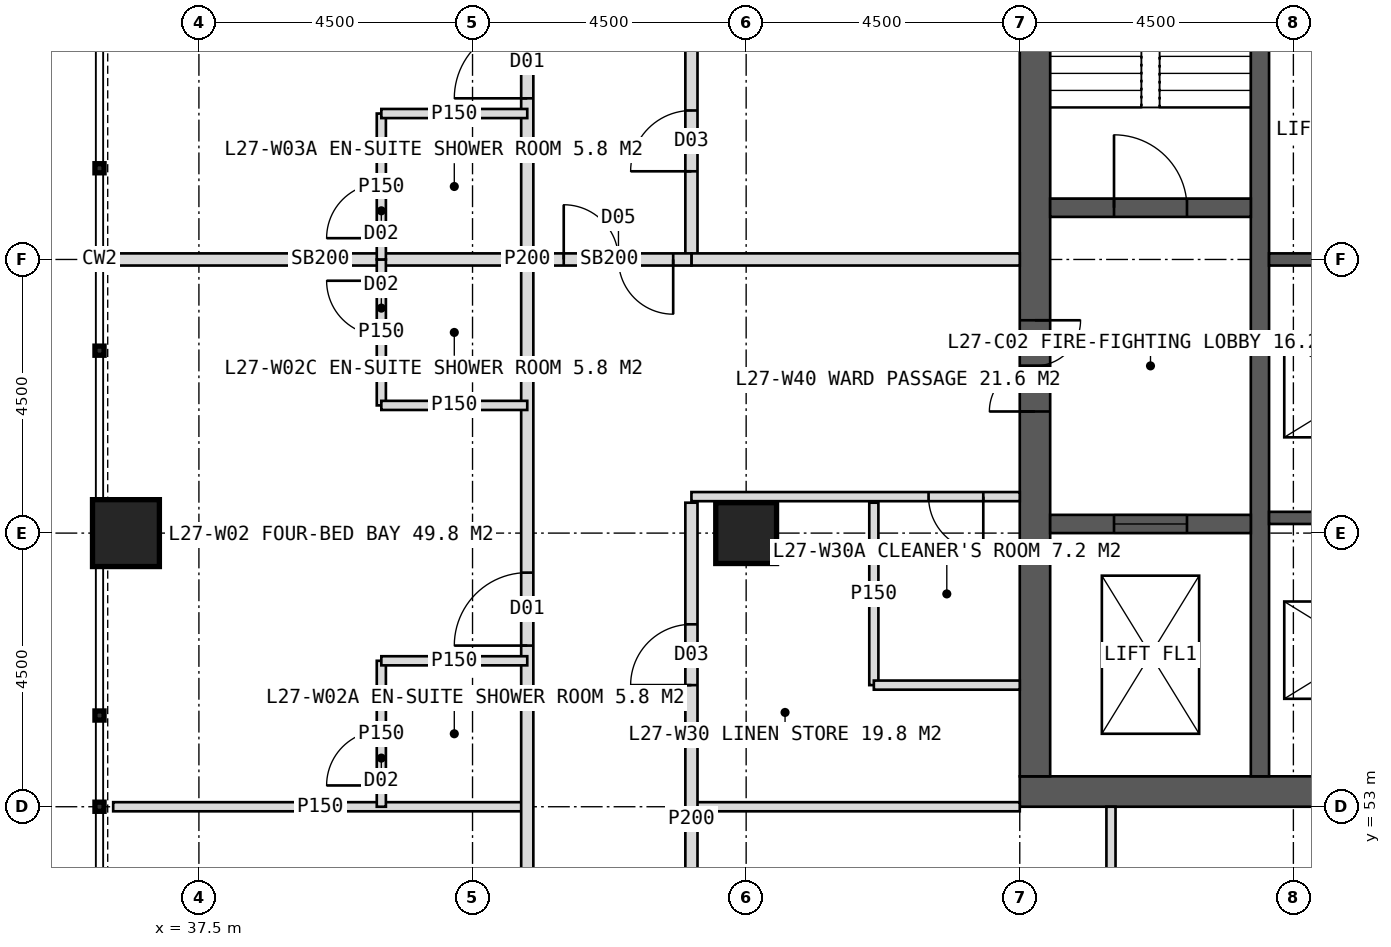
"""IFC4 building model, lengths in metres.
Left out: names, types, materials, properties, quantities, classifications, styles, units other than length and angle.
Written with IfcOpenShell. Run it as: python <this file> out.ifc"""

import sys

from ifc_helpers import new_model, si_unit, direction, frame, frame_2d, origin, origin_2d, place, context, subcontext, project, spatial, rectangle, hollow_rectangle, extrude, element, fill, save


model = new_model("IFC4")
c1 = context("Model", 3, precision=1e-05, world=origin(), true_north=direction((0.0, 1.0)))
c2 = subcontext(c1, "Body", "Model", "MODEL_VIEW")
j1 = project(units=[si_unit("LENGTHUNIT", "METRE"), si_unit("PLANEANGLEUNIT", "RADIAN")], contexts=[c1])
p1 = place(None, origin())
s1 = spatial("IfcSite", under=j1, at=p1, CompositionType="ELEMENT")
p2 = place(p1, origin())
s2 = spatial("IfcBuilding", under=s1, at=p2, CompositionType="ELEMENT")
p3 = place(p2, frame((0.0, 0.0, 116.0)))
s3 = spatial("IfcBuildingStorey", under=s2, at=p3, CompositionType="ELEMENT", Elevation=116.0)
p4 = place(p3, frame((51.0, 53.25, 0.0), z_axis=(0.0, 0.0, 1.0), x_axis=(1.0, 0.0, 0.0)))
e1 = element("IfcWall", 1, at=p4, inside=s3, PredefinedType="SHEAR", context=c2, shape_type="SweptSolid", body=[
    extrude(rectangle(XDim=18.0, YDim=0.5, at=frame_2d((9.0, 0.0))), origin(), (0.0, 0.0, 1.0), 4.0),
])
p5 = place(p4, frame((8.1, 0.0, 0.0)))
e2 = element("IfcOpeningElement", 2, at=p5, cuts=e1, PredefinedType="OPENING", context=c2, shape_type="SweptSolid", body=[
    extrude(rectangle(XDim=1.8, YDim=2.2, at=frame_2d((0.9, 1.1))), frame((0.0, 0.26, 0.0), z_axis=(0.0, -1.0, 0.0), x_axis=(1.0, 0.0, 0.0)), (0.0, 0.0, 1.0), 0.52),
])
p6 = place(p3, frame((51.25, 53.5, 0.0), z_axis=(0.0, 0.0, 1.0), x_axis=(0.0, 1.0, 0.0)))
e3 = element("IfcWall", 3, at=p6, inside=s3, PredefinedType="SHEAR", context=c2, shape_type="SweptSolid", body=[
    extrude(rectangle(XDim=17.0, YDim=0.5, at=frame_2d((8.5, 0.0))), origin(), (0.0, 0.0, 1.0), 4.0),
])
p7 = place(p6, frame((6.0, 0.0, 0.0)))
e4 = element("IfcOpeningElement", 4, at=p7, cuts=e3, PredefinedType="OPENING", context=c2, shape_type="SweptSolid", body=[
    extrude(rectangle(XDim=1.5, YDim=2.2, at=frame_2d((0.75, 1.1))), frame((0.0, 0.26, 0.0), z_axis=(0.0, -1.0, 0.0), x_axis=(1.0, 0.0, 0.0)), (0.0, 0.0, 1.0), 0.52),
])
p8 = place(p3, frame((54.95, 53.5, 0.0), z_axis=(0.0, 0.0, 1.0), x_axis=(0.0, 1.0, 0.0)))
e5 = element("IfcWall", 5, at=p8, inside=s3, PredefinedType="SHEAR", context=c2, shape_type="SweptSolid", body=[
    extrude(rectangle(XDim=17.0, YDim=0.3, at=frame_2d((8.5, 0.0))), origin(), (0.0, 0.0, 1.0), 4.0),
])
for number, where, z_axis, x_axis in (
    (6, (55.1, 57.75, 0.0), (0.0, 0.0, 1.0), (1.0, 0.0, 0.0)),
    (7, (55.1, 62.0, 0.0), (0.0, 0.0, 1.0), (1.0, 0.0, 0.0)),
):
    element("IfcWall", number, at=place(p3, frame(where, z_axis=z_axis, x_axis=x_axis)), inside=s3, PredefinedType="SHEAR", context=c2, shape_type="SweptSolid", body=[
        extrude(rectangle(XDim=3.05, YDim=0.2, at=frame_2d((1.525, 0.0))), origin(), (0.0, 0.0, 1.0), 4.0),
    ])
p9 = place(p3, frame((51.5, 62.85, 0.0), z_axis=(0.0, 0.0, 1.0), x_axis=(1.0, 0.0, 0.0)))
e8 = element("IfcWall", 8, at=p9, inside=s3, PredefinedType="SHEAR", context=c2, shape_type="SweptSolid", body=[
    extrude(rectangle(XDim=3.3, YDim=0.3, at=frame_2d((1.65, 0.0))), origin(), (0.0, 0.0, 1.0), 4.0),
])
p10 = place(p9, frame((1.05, 0.0, 0.0)))
e9 = element("IfcOpeningElement", 9, at=p10, cuts=e8, PredefinedType="OPENING", context=c2, shape_type="SweptSolid", body=[
    extrude(rectangle(XDim=1.2, YDim=2.1, at=frame_2d((0.6, 1.05))), frame((0.0, 0.16, 0.0), z_axis=(0.0, -1.0, 0.0), x_axis=(1.0, 0.0, 0.0)), (0.0, 0.0, 1.0), 0.32),
])
p11 = place(p3, frame((51.5, 57.65, 0.0), z_axis=(0.0, 0.0, 1.0), x_axis=(1.0, 0.0, 0.0)))
e10 = element("IfcWall", 10, at=p11, inside=s3, PredefinedType="SHEAR", context=c2, shape_type="SweptSolid", body=[
    extrude(rectangle(XDim=3.3, YDim=0.3, at=frame_2d((1.65, 0.0))), origin(), (0.0, 0.0, 1.0), 4.0),
])
p12 = place(p11, frame((1.05, 0.0, 0.0)))
e11 = element("IfcOpeningElement", 11, at=p12, cuts=e10, PredefinedType="OPENING", context=c2, shape_type="SweptSolid", body=[
    extrude(rectangle(XDim=1.2, YDim=2.2, at=frame_2d((0.6, 1.1))), frame((0.0, 0.16, 0.0), z_axis=(0.0, -1.0, 0.0), x_axis=(1.0, 0.0, 0.0)), (0.0, 0.0, 1.0), 0.32),
])
p13 = place(p3, frame((46.5, 57.5, 0.0), z_axis=(0.0, 0.0, 1.0), x_axis=(1.0, 0.0, 0.0)))
e12 = element("IfcColumn", 12, at=p13, inside=s3, PredefinedType="COLUMN", context=c2, shape_type="SweptSolid", body=[
    extrude(hollow_rectangle(XDim=1.0, YDim=1.0, WallThickness=0.1, at=origin_2d()), origin(), (0.0, 0.0, 1.0), 4.0),
])
p14 = place(p3, frame((36.3, 57.5, 0.0), z_axis=(0.0, 0.0, 1.0), x_axis=(1.0, 0.0, 0.0)))
e13 = element("IfcColumn", 13, at=p14, inside=s3, PredefinedType="COLUMN", context=c2, shape_type="SweptSolid", body=[
    extrude(hollow_rectangle(XDim=1.1, YDim=1.1, WallThickness=0.1, at=origin_2d()), origin(), (0.0, 0.0, 1.0), 4.0),
])
p15 = place(p3, frame((42.9, 53.0, 0.0), z_axis=(0.0, 0.0, 1.0), x_axis=(-1.0, 0.0, 0.0)))
e14 = element("IfcWall", 14, at=p15, inside=s3, PredefinedType="PARTITIONING", context=c2, shape_type="SweptSolid", body=[
    extrude(rectangle(XDim=6.81, YDim=0.15, at=frame_2d((3.405, 0.0))), origin(), (0.0, 0.0, 1.0), 3.75),
])
p16 = place(p3, frame((42.9, 62.0, 0.0), z_axis=(0.0, 0.0, 1.0), x_axis=(-1.0, 0.0, 0.0)))
e15 = element("IfcWall", 15, at=p16, inside=s3, PredefinedType="SOLIDWALL", context=c2, shape_type="SweptSolid", body=[
    extrude(rectangle(XDim=6.81, YDim=0.2, at=frame_2d((3.405, 0.0))), origin(), (0.0, 0.0, 1.0), 2.95),
])
p17 = place(p3, frame((42.9, 44.9, 0.0), z_axis=(0.0, 0.0, 1.0), x_axis=(0.0, 1.0, 0.0)))
e16 = element("IfcWall", 16, at=p17, inside=s3, PredefinedType="PARTITIONING", context=c2, shape_type="SweptSolid", body=[
    extrude(rectangle(XDim=34.2, YDim=0.2, at=frame_2d((17.1, 0.0))), origin(), (0.0, 0.0, 1.0), 3.75),
])
p18 = place(p17, frame((3.25, 0.0, 0.0)))
e17 = element("IfcOpeningElement", 17, at=p18, cuts=e16, PredefinedType="OPENING", context=c2, shape_type="SweptSolid", body=[
    extrude(rectangle(XDim=1.2, YDim=2.2, at=frame_2d((0.6, 1.1))), frame((0.0, 0.11, 0.0), z_axis=(0.0, -1.0, 0.0), x_axis=(1.0, 0.0, 0.0)), (0.0, 0.0, 1.0), 0.22),
])
p19 = place(p17, frame((10.75, 0.0, 0.0)))
e18 = element("IfcOpeningElement", 18, at=p19, cuts=e16, PredefinedType="OPENING", context=c2, shape_type="SweptSolid", body=[
    extrude(rectangle(XDim=1.2, YDim=2.2, at=frame_2d((0.6, 1.1))), frame((0.0, 0.11, 0.0), z_axis=(0.0, -1.0, 0.0), x_axis=(1.0, 0.0, 0.0)), (0.0, 0.0, 1.0), 0.22),
])
p20 = place(p17, frame((19.75, 0.0, 0.0)))
e19 = element("IfcOpeningElement", 19, at=p20, cuts=e16, PredefinedType="OPENING", context=c2, shape_type="SweptSolid", body=[
    extrude(rectangle(XDim=1.2, YDim=2.2, at=frame_2d((0.6, 1.1))), frame((0.0, 0.11, 0.0), z_axis=(0.0, -1.0, 0.0), x_axis=(1.0, 0.0, 0.0)), (0.0, 0.0, 1.0), 0.22),
])
p21 = place(p17, frame((28.75, 0.0, 0.0)))
e20 = element("IfcOpeningElement", 20, at=p21, cuts=e16, PredefinedType="OPENING", context=c2, shape_type="SweptSolid", body=[
    extrude(rectangle(XDim=1.2, YDim=2.2, at=frame_2d((0.6, 1.1))), frame((0.0, 0.11, 0.0), z_axis=(0.0, -1.0, 0.0), x_axis=(1.0, 0.0, 0.0)), (0.0, 0.0, 1.0), 0.22),
])
p22 = place(p3, frame((40.5, 53.0, 0.0), z_axis=(0.0, 0.0, 1.0), x_axis=(0.0, 1.0, 0.0)))
e21 = element("IfcWall", 21, at=p22, inside=s3, PredefinedType="PARTITIONING", context=c2, shape_type="SweptSolid", body=[
    extrude(rectangle(XDim=2.4, YDim=0.15, at=frame_2d((1.2, 0.0))), origin(), (0.0, 0.0, 1.0), 3.75),
])
p23 = place(p22, frame((0.35, 0.0, 0.0)))
e22 = element("IfcOpeningElement", 22, at=p23, cuts=e21, PredefinedType="OPENING", context=c2, shape_type="SweptSolid", body=[
    extrude(rectangle(XDim=0.9, YDim=2.1, at=frame_2d((0.45, 1.05))), frame((0.0, 0.085, 0.0), z_axis=(0.0, -1.0, 0.0), x_axis=(1.0, 0.0, 0.0)), (0.0, 0.0, 1.0), 0.17),
])
p24 = place(p3, frame((42.9, 55.4, 0.0), z_axis=(0.0, 0.0, 1.0), x_axis=(-1.0, 0.0, 0.0)))
e23 = element("IfcWall", 23, at=p24, inside=s3, PredefinedType="PARTITIONING", context=c2, shape_type="SweptSolid", body=[
    extrude(rectangle(XDim=2.4, YDim=0.15, at=frame_2d((1.2, 0.0))), origin(), (0.0, 0.0, 1.0), 3.75),
])
p25 = place(p3, frame((40.5, 59.6, 0.0), z_axis=(0.0, 0.0, 1.0), x_axis=(0.0, 1.0, 0.0)))
e24 = element("IfcWall", 24, at=p25, inside=s3, PredefinedType="PARTITIONING", context=c2, shape_type="SweptSolid", body=[
    extrude(rectangle(XDim=2.4, YDim=0.15, at=frame_2d((1.2, 0.0))), origin(), (0.0, 0.0, 1.0), 3.75),
])
p26 = place(p25, frame((1.15, 0.0, 0.0)))
e25 = element("IfcOpeningElement", 25, at=p26, cuts=e24, PredefinedType="OPENING", context=c2, shape_type="SweptSolid", body=[
    extrude(rectangle(XDim=0.9, YDim=2.1, at=frame_2d((0.45, 1.05))), frame((0.0, 0.085, 0.0), z_axis=(0.0, -1.0, 0.0), x_axis=(1.0, 0.0, 0.0)), (0.0, 0.0, 1.0), 0.17),
])
p27 = place(p3, frame((42.9, 59.6, 0.0), z_axis=(0.0, 0.0, 1.0), x_axis=(-1.0, 0.0, 0.0)))
e26 = element("IfcWall", 26, at=p27, inside=s3, PredefinedType="PARTITIONING", context=c2, shape_type="SweptSolid", body=[
    extrude(rectangle(XDim=2.4, YDim=0.15, at=frame_2d((1.2, 0.0))), origin(), (0.0, 0.0, 1.0), 3.75),
])
p28 = place(p3, frame((40.5, 62.0, 0.0), z_axis=(0.0, 0.0, 1.0), x_axis=(0.0, 1.0, 0.0)))
e27 = element("IfcWall", 27, at=p28, inside=s3, PredefinedType="PARTITIONING", context=c2, shape_type="SweptSolid", body=[
    extrude(rectangle(XDim=2.4, YDim=0.15, at=frame_2d((1.2, 0.0))), origin(), (0.0, 0.0, 1.0), 3.75),
])
p29 = place(p28, frame((0.35, 0.0, 0.0)))
e28 = element("IfcOpeningElement", 28, at=p29, cuts=e27, PredefinedType="OPENING", context=c2, shape_type="SweptSolid", body=[
    extrude(rectangle(XDim=0.9, YDim=2.1, at=frame_2d((0.45, 1.05))), frame((0.0, 0.085, 0.0), z_axis=(0.0, -1.0, 0.0), x_axis=(1.0, 0.0, 0.0)), (0.0, 0.0, 1.0), 0.17),
])
p30 = place(p3, frame((42.9, 64.4, 0.0), z_axis=(0.0, 0.0, 1.0), x_axis=(-1.0, 0.0, 0.0)))
e29 = element("IfcWall", 29, at=p30, inside=s3, PredefinedType="PARTITIONING", context=c2, shape_type="SweptSolid", body=[
    extrude(rectangle(XDim=2.4, YDim=0.15, at=frame_2d((1.2, 0.0))), origin(), (0.0, 0.0, 1.0), 3.75),
])
p31 = place(p3, frame((51.0, 53.0, 0.0), z_axis=(0.0, 0.0, 1.0), x_axis=(-1.0, 0.0, 0.0)))
e30 = element("IfcWall", 30, at=p31, inside=s3, PredefinedType="PARTITIONING", context=c2, shape_type="SweptSolid", body=[
    extrude(rectangle(XDim=5.4, YDim=0.15, at=frame_2d((2.7, 0.0))), origin(), (0.0, 0.0, 1.0), 3.75),
])
p32 = place(p3, frame((45.6, 47.6, 0.0), z_axis=(0.0, 0.0, 1.0), x_axis=(0.0, 1.0, 0.0)))
e31 = element("IfcWall", 31, at=p32, inside=s3, PredefinedType="PARTITIONING", context=c2, shape_type="SweptSolid", body=[
    extrude(rectangle(XDim=10.4, YDim=0.2, at=frame_2d((5.2, 0.0))), origin(), (0.0, 0.0, 1.0), 3.75),
])
p33 = place(p32, frame((7.4, 0.0, 0.0)))
e32 = element("IfcOpeningElement", 32, at=p33, cuts=e31, PredefinedType="OPENING", context=c2, shape_type="SweptSolid", body=[
    extrude(rectangle(XDim=1.0, YDim=2.1, at=frame_2d((0.5, 1.05))), frame((0.0, 0.11, 0.0), z_axis=(0.0, -1.0, 0.0), x_axis=(1.0, 0.0, 0.0)), (0.0, 0.0, 1.0), 0.22),
])
p34 = place(p3, frame((45.6, 62.0, 0.0), z_axis=(0.0, 0.0, 1.0), x_axis=(0.0, 1.0, 0.0)))
e33 = element("IfcWall", 33, at=p34, inside=s3, PredefinedType="PARTITIONING", context=c2, shape_type="SweptSolid", body=[
    extrude(rectangle(XDim=14.4, YDim=0.2, at=frame_2d((7.2, 0.0))), origin(), (0.0, 0.0, 1.0), 3.75),
])
p35 = place(p34, frame((1.45, 0.0, 0.0)))
e34 = element("IfcOpeningElement", 34, at=p35, cuts=e33, PredefinedType="OPENING", context=c2, shape_type="SweptSolid", body=[
    extrude(rectangle(XDim=1.0, YDim=2.1, at=frame_2d((0.5, 1.05))), frame((0.0, 0.11, 0.0), z_axis=(0.0, -1.0, 0.0), x_axis=(1.0, 0.0, 0.0)), (0.0, 0.0, 1.0), 0.22),
])
p36 = place(p34, frame((11.2, 0.0, 0.0)))
e35 = element("IfcOpeningElement", 35, at=p36, cuts=e33, PredefinedType="OPENING", context=c2, shape_type="SweptSolid", body=[
    extrude(rectangle(XDim=1.0, YDim=2.1, at=frame_2d((0.5, 1.05))), frame((0.0, 0.11, 0.0), z_axis=(0.0, -1.0, 0.0), x_axis=(1.0, 0.0, 0.0)), (0.0, 0.0, 1.0), 0.22),
])
p37 = place(p3, frame((51.0, 58.1, 0.0), z_axis=(0.0, 0.0, 1.0), x_axis=(-1.0, 0.0, 0.0)))
e36 = element("IfcWall", 36, at=p37, inside=s3, PredefinedType="PARTITIONING", context=c2, shape_type="SweptSolid", body=[
    extrude(rectangle(XDim=5.4, YDim=0.15, at=frame_2d((2.7, 0.0))), origin(), (0.0, 0.0, 1.0), 3.75),
])
p38 = place(p37, frame((0.6, 0.0, 0.0)))
e37 = element("IfcOpeningElement", 37, at=p38, cuts=e36, PredefinedType="OPENING", context=c2, shape_type="SweptSolid", body=[
    extrude(rectangle(XDim=0.9, YDim=2.1, at=frame_2d((0.45, 1.05))), frame((0.0, 0.085, 0.0), z_axis=(0.0, -1.0, 0.0), x_axis=(1.0, 0.0, 0.0)), (0.0, 0.0, 1.0), 0.17),
])
p39 = place(p3, frame((51.0, 62.0, 0.0), z_axis=(0.0, 0.0, 1.0), x_axis=(-1.0, 0.0, 0.0)))
e38 = element("IfcWall", 38, at=p39, inside=s3, PredefinedType="SOLIDWALL", context=c2, shape_type="SweptSolid", body=[
    extrude(rectangle(XDim=5.4, YDim=0.2, at=frame_2d((2.7, 0.0))), origin(), (0.0, 0.0, 1.0), 2.95),
])
p40 = place(p3, frame((48.6, 55.0, 0.0), z_axis=(0.0, 0.0, 1.0), x_axis=(0.0, 1.0, 0.0)))
e39 = element("IfcWall", 39, at=p40, inside=s3, PredefinedType="PARTITIONING", context=c2, shape_type="SweptSolid", body=[
    extrude(rectangle(XDim=3.0, YDim=0.15, at=frame_2d((1.5, 0.0))), origin(), (0.0, 0.0, 1.0), 3.75),
])
p41 = place(p3, frame((51.0, 55.0, 0.0), z_axis=(0.0, 0.0, 1.0), x_axis=(-1.0, 0.0, 0.0)))
e40 = element("IfcWall", 40, at=p41, inside=s3, PredefinedType="PARTITIONING", context=c2, shape_type="SweptSolid", body=[
    extrude(rectangle(XDim=2.4, YDim=0.15, at=frame_2d((1.2, 0.0))), origin(), (0.0, 0.0, 1.0), 3.75),
])
p42 = place(p3, frame((52.5, 53.0, 0.0), z_axis=(0.0, 0.0, 1.0), x_axis=(0.0, -1.0, 0.0)))
e41 = element("IfcWall", 41, at=p42, inside=s3, PredefinedType="PARTITIONING", context=c2, shape_type="SweptSolid", body=[
    extrude(rectangle(XDim=5.4, YDim=0.15, at=frame_2d((2.7, 0.0))), origin(), (0.0, 0.0, 1.0), 3.75),
])
p43 = place(p3, frame((45.6, 62.0, 0.0), z_axis=(0.0, 0.0, 1.0), x_axis=(-1.0, 0.0, 0.0)))
e42 = element("IfcWall", 42, at=p43, inside=s3, PredefinedType="SOLIDWALL", context=c2, shape_type="SweptSolid", body=[
    extrude(rectangle(XDim=2.7, YDim=0.2, at=frame_2d((1.35, 0.0))), origin(), (0.0, 0.0, 1.0), 2.95),
])
p44 = place(p43, frame((0.3, 0.0, 0.0)))
e43 = element("IfcOpeningElement", 43, at=p44, cuts=e42, PredefinedType="OPENING", context=c2, shape_type="SweptSolid", body=[
    extrude(rectangle(XDim=1.8, YDim=2.2, at=frame_2d((0.9, 1.1))), frame((0.0, 0.11, 0.0), z_axis=(0.0, -1.0, 0.0), x_axis=(1.0, 0.0, 0.0)), (0.0, 0.0, 1.0), 0.22),
])
p45 = place(p19, origin())
e44 = element("IfcDoor", 44, at=p45, inside=s3, OperationType="SINGLE_SWING_LEFT", PredefinedType="DOOR", context=c2, shape_type="SweptSolid", body=[
    extrude(rectangle(XDim=1.2, YDim=2.2, at=frame_2d((0.6, 1.1))), frame((0.0, 0.025, 0.0), z_axis=(0.0, -1.0, 0.0), x_axis=(1.0, 0.0, 0.0)), (0.0, 0.0, 1.0), 0.05),
])
fill(e18, e44)
p46 = place(p23, origin())
e45 = element("IfcDoor", 45, at=p46, inside=s3, OperationType="SINGLE_SWING_LEFT", PredefinedType="DOOR", context=c2, shape_type="SweptSolid", body=[
    extrude(rectangle(XDim=0.9, YDim=2.1, at=frame_2d((0.45, 1.05))), frame((0.0, 0.025, 0.0), z_axis=(0.0, -1.0, 0.0), x_axis=(1.0, 0.0, 0.0)), (0.0, 0.0, 1.0), 0.05),
])
fill(e22, e45)
p47 = place(p26, origin())
e46 = element("IfcDoor", 46, at=p47, inside=s3, OperationType="SINGLE_SWING_RIGHT", PredefinedType="DOOR", context=c2, shape_type="SweptSolid", body=[
    extrude(rectangle(XDim=0.9, YDim=2.1, at=frame_2d((0.45, 1.05))), frame((0.0, 0.025, 0.0), z_axis=(0.0, -1.0, 0.0), x_axis=(1.0, 0.0, 0.0)), (0.0, 0.0, 1.0), 0.05),
])
fill(e25, e46)
p48 = place(p20, origin())
e47 = element("IfcDoor", 47, at=p48, inside=s3, OperationType="SINGLE_SWING_LEFT", PredefinedType="DOOR", context=c2, shape_type="SweptSolid", body=[
    extrude(rectangle(XDim=1.2, YDim=2.2, at=frame_2d((0.6, 1.1))), frame((0.0, 0.025, 0.0), z_axis=(0.0, -1.0, 0.0), x_axis=(1.0, 0.0, 0.0)), (0.0, 0.0, 1.0), 0.05),
])
fill(e19, e47)
p49 = place(p29, origin())
e48 = element("IfcDoor", 48, at=p49, inside=s3, OperationType="SINGLE_SWING_LEFT", PredefinedType="DOOR", context=c2, shape_type="SweptSolid", body=[
    extrude(rectangle(XDim=0.9, YDim=2.1, at=frame_2d((0.45, 1.05))), frame((0.0, 0.025, 0.0), z_axis=(0.0, -1.0, 0.0), x_axis=(1.0, 0.0, 0.0)), (0.0, 0.0, 1.0), 0.05),
])
fill(e28, e48)
p50 = place(p38, origin())
e49 = element("IfcDoor", 49, at=p50, inside=s3, OperationType="SINGLE_SWING_LEFT", PredefinedType="DOOR", context=c2, shape_type="SweptSolid", body=[
    extrude(rectangle(XDim=0.9, YDim=2.1, at=frame_2d((0.45, 1.05))), frame((0.0, 0.025, 0.0), z_axis=(0.0, -1.0, 0.0), x_axis=(1.0, 0.0, 0.0)), (0.0, 0.0, 1.0), 0.05),
])
fill(e37, e49)
p51 = place(p33, origin())
e50 = element("IfcDoor", 50, at=p51, inside=s3, OperationType="SINGLE_SWING_LEFT", PredefinedType="DOOR", context=c2, shape_type="SweptSolid", body=[
    extrude(rectangle(XDim=1.0, YDim=2.1, at=frame_2d((0.5, 1.05))), frame((0.0, 0.025, 0.0), z_axis=(0.0, -1.0, 0.0), x_axis=(1.0, 0.0, 0.0)), (0.0, 0.0, 1.0), 0.05),
])
fill(e32, e50)
p52 = place(p35, origin())
e51 = element("IfcDoor", 51, at=p52, inside=s3, OperationType="SINGLE_SWING_LEFT", PredefinedType="DOOR", context=c2, shape_type="SweptSolid", body=[
    extrude(rectangle(XDim=1.0, YDim=2.1, at=frame_2d((0.5, 1.05))), frame((0.0, 0.025, 0.0), z_axis=(0.0, -1.0, 0.0), x_axis=(1.0, 0.0, 0.0)), (0.0, 0.0, 1.0), 0.05),
])
fill(e34, e51)
p53 = place(p44, origin())
e52 = element("IfcDoor", 52, at=p53, inside=s3, OperationType="DOUBLE_DOOR_DOUBLE_SWING", PredefinedType="DOOR", context=c2, shape_type="SweptSolid", body=[
    extrude(rectangle(XDim=1.8, YDim=2.2, at=frame_2d((0.9, 1.1))), frame((0.0, 0.025, 0.0), z_axis=(0.0, -1.0, 0.0), x_axis=(1.0, 0.0, 0.0)), (0.0, 0.0, 1.0), 0.05),
])
fill(e43, e52)
p54 = place(p7, origin())
e53 = element("IfcDoor", 53, at=p54, inside=s3, OperationType="DOUBLE_DOOR_SINGLE_SWING", PredefinedType="DOOR", context=c2, shape_type="SweptSolid", body=[
    extrude(rectangle(XDim=1.5, YDim=2.2, at=frame_2d((0.75, 1.1))), frame((0.0, 0.025, 0.0), z_axis=(0.0, -1.0, 0.0), x_axis=(1.0, 0.0, 0.0)), (0.0, 0.0, 1.0), 0.05),
])
fill(e4, e53)
p55 = place(p10, origin())
e54 = element("IfcDoor", 54, at=p55, inside=s3, OperationType="SINGLE_SWING_LEFT", PredefinedType="DOOR", context=c2, shape_type="SweptSolid", body=[
    extrude(rectangle(XDim=1.2, YDim=2.1, at=frame_2d((0.6, 1.05))), frame((0.0, 0.025, 0.0), z_axis=(0.0, -1.0, 0.0), x_axis=(1.0, 0.0, 0.0)), (0.0, 0.0, 1.0), 0.05),
])
fill(e9, e54)
p56 = place(p12, origin())
e55 = element("IfcDoor", 55, at=p56, inside=s3, OperationType="SLIDING_TO_LEFT", PredefinedType="DOOR", context=c2, shape_type="SweptSolid", body=[
    extrude(rectangle(XDim=1.2, YDim=2.2, at=frame_2d((0.6, 1.1))), frame((0.0, 0.025, 0.0), z_axis=(0.0, -1.0, 0.0), x_axis=(1.0, 0.0, 0.0)), (0.0, 0.0, 1.0), 0.05),
])
fill(e11, e55)
save(model, sys.argv[1])
